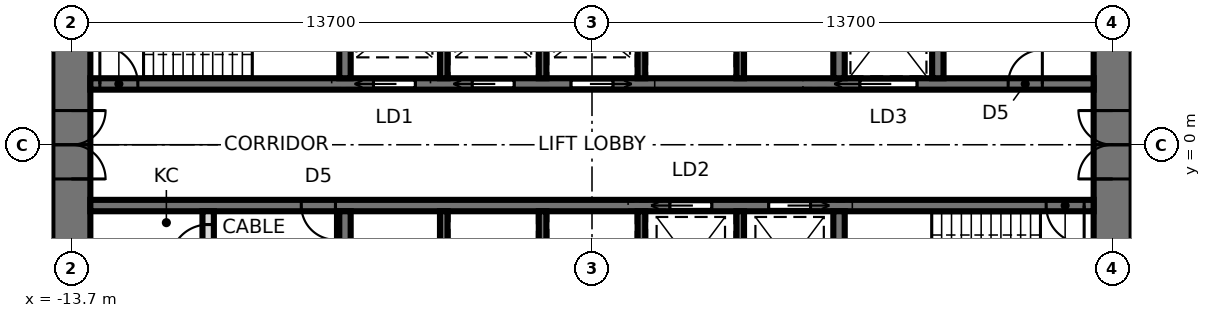
"""IFC4 building model, lengths in metres.
Left out: names, types, materials, properties, quantities, classifications, styles, units other than length and angle.
Written with IfcOpenShell. Run it as: python <this file> out.ifc"""

import sys

from ifc_helpers import new_model, si_unit, direction, frame, frame_2d, origin, place, context, subcontext, project, spatial, rectangle, extrude, element, fill, save


model = new_model("IFC4")
c1 = context("Model", 3, precision=1e-05, world=origin(), true_north=direction((0.0, 1.0)))
c2 = subcontext(c1, "Body", "Model", "MODEL_VIEW")
j1 = project(units=[si_unit("LENGTHUNIT", "METRE"), si_unit("PLANEANGLEUNIT", "RADIAN")], contexts=[c1])
p1 = place(None, origin())
s1 = spatial("IfcSite", under=j1, at=p1, CompositionType="ELEMENT")
p2 = place(p1, origin())
s2 = spatial("IfcBuilding", under=s1, at=p2, CompositionType="ELEMENT")
p3 = place(p2, frame((0.0, 0.0, 65.8)))
s3 = spatial("IfcBuildingStorey", under=s2, at=p3, CompositionType="ELEMENT", Elevation=65.8)
p4 = place(p3, frame((13.7, -9.5, 0.0), z_axis=(0.0, 0.0, 1.0), x_axis=(0.0, 1.0, 0.0)))
e1 = element("IfcWall", 1, at=p4, inside=s3, PredefinedType="SHEAR", context=c2, shape_type="SweptSolid", body=[
    extrude(rectangle(XDim=19.0, YDim=1.0, at=frame_2d((9.5, 0.0))), origin(), (0.0, 0.0, 1.0), 4.2),
])
p5 = place(p4, frame((8.6, 0.0, 0.0)))
e2 = element("IfcOpeningElement", 2, at=p5, cuts=e1, PredefinedType="OPENING", context=c2, shape_type="SweptSolid", body=[
    extrude(rectangle(XDim=1.8, YDim=2.4, at=frame_2d((0.9, 1.2))), frame((0.0, 0.51, 0.0), z_axis=(0.0, -1.0, 0.0), x_axis=(1.0, 0.0, 0.0)), (0.0, 0.0, 1.0), 1.02),
])
p6 = place(p3, frame((-13.7, 9.5, 0.0), z_axis=(0.0, 0.0, 1.0), x_axis=(0.0, -1.0, 0.0)))
e3 = element("IfcWall", 3, at=p6, inside=s3, PredefinedType="SHEAR", context=c2, shape_type="SweptSolid", body=[
    extrude(rectangle(XDim=19.0, YDim=1.0, at=frame_2d((9.5, 0.0))), origin(), (0.0, 0.0, 1.0), 4.2),
])
p7 = place(p6, frame((8.6, 0.0, 0.0)))
e4 = element("IfcOpeningElement", 4, at=p7, cuts=e3, PredefinedType="OPENING", context=c2, shape_type="SweptSolid", body=[
    extrude(rectangle(XDim=1.8, YDim=2.4, at=frame_2d((0.9, 1.2))), frame((0.0, 0.51, 0.0), z_axis=(0.0, -1.0, 0.0), x_axis=(1.0, 0.0, 0.0)), (0.0, 0.0, 1.0), 1.02),
])
p8 = place(p3, frame((-13.2, 1.6, 0.0), z_axis=(0.0, 0.0, 1.0), x_axis=(1.0, 0.0, 0.0)))
e5 = element("IfcWall", 5, at=p8, inside=s3, PredefinedType="SHEAR", context=c2, shape_type="SweptSolid", body=[
    extrude(rectangle(XDim=26.4, YDim=0.3, at=frame_2d((13.2, 0.0))), origin(), (0.0, 0.0, 1.0), 4.2),
])
p9 = place(p8, frame((0.25, 0.0, 0.0)))
e6 = element("IfcOpeningElement", 6, at=p9, cuts=e5, PredefinedType="OPENING", context=c2, shape_type="SweptSolid", body=[
    extrude(rectangle(XDim=1.0, YDim=2.1, at=frame_2d((0.5, 1.05))), frame((0.0, 0.16, 0.0), z_axis=(0.0, -1.0, 0.0), x_axis=(1.0, 0.0, 0.0)), (0.0, 0.0, 1.0), 0.32),
])
p10 = place(p8, frame((20.25, 0.0, 0.0)))
e7 = element("IfcOpeningElement", 7, at=p10, cuts=e5, PredefinedType="OPENING", context=c2, shape_type="SweptSolid", body=[
    extrude(rectangle(XDim=1.5, YDim=2.4, at=frame_2d((0.75, 1.2))), frame((0.0, 0.16, 0.0), z_axis=(0.0, -1.0, 0.0), x_axis=(1.0, 0.0, 0.0)), (0.0, 0.0, 1.0), 0.32),
])
p11 = place(p8, frame((7.45, 0.0, 0.0)))
e8 = element("IfcOpeningElement", 8, at=p11, cuts=e5, PredefinedType="OPENING", context=c2, shape_type="SweptSolid", body=[
    extrude(rectangle(XDim=1.1, YDim=2.3, at=frame_2d((0.55, 1.15))), frame((0.0, 0.16, 0.0), z_axis=(0.0, -1.0, 0.0), x_axis=(1.0, 0.0, 0.0)), (0.0, 0.0, 1.0), 0.32),
])
p12 = place(p8, frame((10.05, 0.0, 0.0)))
e9 = element("IfcOpeningElement", 9, at=p12, cuts=e5, PredefinedType="OPENING", context=c2, shape_type="SweptSolid", body=[
    extrude(rectangle(XDim=1.1, YDim=2.3, at=frame_2d((0.55, 1.15))), frame((0.0, 0.16, 0.0), z_axis=(0.0, -1.0, 0.0), x_axis=(1.0, 0.0, 0.0)), (0.0, 0.0, 1.0), 0.32),
])
p13 = place(p8, frame((12.65, 0.0, 0.0)))
e10 = element("IfcOpeningElement", 10, at=p13, cuts=e5, PredefinedType="OPENING", context=c2, shape_type="SweptSolid", body=[
    extrude(rectangle(XDim=1.1, YDim=2.3, at=frame_2d((0.55, 1.15))), frame((0.0, 0.16, 0.0), z_axis=(0.0, -1.0, 0.0), x_axis=(1.0, 0.0, 0.0)), (0.0, 0.0, 1.0), 0.32),
])
p14 = place(p8, frame((24.15, 0.0, 0.0)))
e11 = element("IfcOpeningElement", 11, at=p14, cuts=e5, PredefinedType="OPENING", context=c2, shape_type="SweptSolid", body=[
    extrude(rectangle(XDim=0.9, YDim=2.1, at=frame_2d((0.45, 1.05))), frame((0.0, 0.16, 0.0), z_axis=(0.0, -1.0, 0.0), x_axis=(1.0, 0.0, 0.0)), (0.0, 0.0, 1.0), 0.32),
])
p15 = place(p3, frame((-13.2, -1.6, 0.0), z_axis=(0.0, 0.0, 1.0), x_axis=(1.0, 0.0, 0.0)))
e12 = element("IfcWall", 12, at=p15, inside=s3, PredefinedType="SHEAR", context=c2, shape_type="SweptSolid", body=[
    extrude(rectangle(XDim=26.4, YDim=0.3, at=frame_2d((13.2, 0.0))), origin(), (0.0, 0.0, 1.0), 4.2),
])
p16 = place(p15, frame((25.15, 0.0, 0.0)))
e13 = element("IfcOpeningElement", 13, at=p16, cuts=e12, PredefinedType="OPENING", context=c2, shape_type="SweptSolid", body=[
    extrude(rectangle(XDim=1.0, YDim=2.1, at=frame_2d((0.5, 1.05))), frame((0.0, 0.16, 0.0), z_axis=(0.0, -1.0, 0.0), x_axis=(1.0, 0.0, 0.0)), (0.0, 0.0, 1.0), 0.32),
])
p17 = place(p15, frame((15.25, 0.0, 0.0)))
e14 = element("IfcOpeningElement", 14, at=p17, cuts=e12, PredefinedType="OPENING", context=c2, shape_type="SweptSolid", body=[
    extrude(rectangle(XDim=1.1, YDim=2.3, at=frame_2d((0.55, 1.15))), frame((0.0, 0.16, 0.0), z_axis=(0.0, -1.0, 0.0), x_axis=(1.0, 0.0, 0.0)), (0.0, 0.0, 1.0), 0.32),
])
p18 = place(p15, frame((17.85, 0.0, 0.0)))
e15 = element("IfcOpeningElement", 15, at=p18, cuts=e12, PredefinedType="OPENING", context=c2, shape_type="SweptSolid", body=[
    extrude(rectangle(XDim=1.1, YDim=2.3, at=frame_2d((0.55, 1.15))), frame((0.0, 0.16, 0.0), z_axis=(0.0, -1.0, 0.0), x_axis=(1.0, 0.0, 0.0)), (0.0, 0.0, 1.0), 0.32),
])
p19 = place(p15, frame((5.55, 0.0, 0.0)))
e16 = element("IfcOpeningElement", 16, at=p19, cuts=e12, PredefinedType="OPENING", context=c2, shape_type="SweptSolid", body=[
    extrude(rectangle(XDim=0.9, YDim=2.1, at=frame_2d((0.45, 1.05))), frame((0.0, 0.16, 0.0), z_axis=(0.0, -1.0, 0.0), x_axis=(1.0, 0.0, 0.0)), (0.0, 0.0, 1.0), 0.32),
])
for number, where, z_axis, x_axis in (
    (17, (-6.5, 1.75, 0.0), (0.0, 0.0, 1.0), (0.0, 1.0, 0.0)),
    (18, (6.5, 1.75, 0.0), (0.0, 0.0, 1.0), (0.0, 1.0, 0.0)),
):
    element("IfcWall", number, at=place(p3, frame(where, z_axis=z_axis, x_axis=x_axis)), inside=s3, PredefinedType="SHEAR", context=c2, shape_type="SweptSolid", body=[
        extrude(rectangle(XDim=2.7, YDim=0.3, at=frame_2d((1.35, 0.0))), origin(), (0.0, 0.0, 1.0), 4.2),
    ])
for number, where, z_axis, x_axis in (
    (19, (-3.9, 1.75, 0.0), (0.0, 0.0, 1.0), (0.0, 1.0, 0.0)),
    (20, (-1.3, 1.75, 0.0), (0.0, 0.0, 1.0), (0.0, 1.0, 0.0)),
    (21, (1.3, 1.75, 0.0), (0.0, 0.0, 1.0), (0.0, 1.0, 0.0)),
    (22, (3.9, 1.75, 0.0), (0.0, 0.0, 1.0), (0.0, 1.0, 0.0)),
):
    element("IfcWall", number, at=place(p3, frame(where, z_axis=z_axis, x_axis=x_axis)), inside=s3, PredefinedType="SHEAR", context=c2, shape_type="SweptSolid", body=[
        extrude(rectangle(XDim=2.7, YDim=0.2, at=frame_2d((1.35, 0.0))), origin(), (0.0, 0.0, 1.0), 4.2),
    ])
for number, where, z_axis, x_axis in (
    (23, (-6.5, -1.75, 0.0), (0.0, 0.0, 1.0), (0.0, -1.0, 0.0)),
    (24, (6.5, -1.75, 0.0), (0.0, 0.0, 1.0), (0.0, -1.0, 0.0)),
):
    element("IfcWall", number, at=place(p3, frame(where, z_axis=z_axis, x_axis=x_axis)), inside=s3, PredefinedType="SHEAR", context=c2, shape_type="SweptSolid", body=[
        extrude(rectangle(XDim=2.7, YDim=0.3, at=frame_2d((1.35, 0.0))), origin(), (0.0, 0.0, 1.0), 4.2),
    ])
for number, where, z_axis, x_axis in (
    (25, (-3.9, -1.75, 0.0), (0.0, 0.0, 1.0), (0.0, -1.0, 0.0)),
    (26, (-1.3, -1.75, 0.0), (0.0, 0.0, 1.0), (0.0, -1.0, 0.0)),
    (27, (1.3, -1.75, 0.0), (0.0, 0.0, 1.0), (0.0, -1.0, 0.0)),
    (28, (3.9, -1.75, 0.0), (0.0, 0.0, 1.0), (0.0, -1.0, 0.0)),
):
    element("IfcWall", number, at=place(p3, frame(where, z_axis=z_axis, x_axis=x_axis)), inside=s3, PredefinedType="SHEAR", context=c2, shape_type="SweptSolid", body=[
        extrude(rectangle(XDim=2.7, YDim=0.2, at=frame_2d((1.35, 0.0))), origin(), (0.0, 0.0, 1.0), 4.2),
    ])
p20 = place(p3, frame((9.1, 1.75, 0.0), z_axis=(0.0, 0.0, 1.0), x_axis=(0.0, 1.0, 0.0)))
e29 = element("IfcWall", 29, at=p20, inside=s3, PredefinedType="SHEAR", context=c2, shape_type="SweptSolid", body=[
    extrude(rectangle(XDim=2.7, YDim=0.3, at=frame_2d((1.35, 0.0))), origin(), (0.0, 0.0, 1.0), 4.2),
])
p21 = place(p3, frame((-10.1, -3.25, 0.0), z_axis=(0.0, 0.0, 1.0), x_axis=(0.0, 1.0, 0.0)))
e30 = element("IfcWall", 30, at=p21, inside=s3, PredefinedType="PARTITIONING", context=c2, shape_type="SweptSolid", body=[
    extrude(rectangle(XDim=1.5, YDim=0.3, at=frame_2d((0.75, 0.0))), origin(), (0.0, 0.0, 1.0), 4.04),
])
p22 = place(p21, frame((0.15, 0.0, 0.0)))
e31 = element("IfcOpeningElement", 31, at=p22, cuts=e30, PredefinedType="OPENING", context=c2, shape_type="SweptSolid", body=[
    extrude(rectangle(XDim=1.0, YDim=2.4, at=frame_2d((0.5, 1.2))), frame((0.0, 0.16, 0.0), z_axis=(0.0, -1.0, 0.0), x_axis=(1.0, 0.0, 0.0)), (0.0, 0.0, 1.0), 0.32),
])
p23 = place(p7, origin())
e32 = element("IfcDoor", 32, at=p23, inside=s3, OperationType="DOUBLE_DOOR_SINGLE_SWING", PredefinedType="DOOR", context=c2, shape_type="SweptSolid", body=[
    extrude(rectangle(XDim=1.72, YDim=2.36, at=frame_2d((0.9, 1.18))), frame((0.0, 0.025, 0.0), z_axis=(0.0, -1.0, 0.0), x_axis=(1.0, 0.0, 0.0)), (0.0, 0.0, 1.0), 0.05),
    extrude(rectangle(XDim=0.04, YDim=2.4, at=frame_2d((0.02, 1.2))), frame((0.0, 0.25, 0.0), z_axis=(0.0, -1.0, 0.0), x_axis=(1.0, 0.0, 0.0)), (0.0, 0.0, 1.0), 0.5),
    extrude(rectangle(XDim=0.04, YDim=2.4, at=frame_2d((1.78, 1.2))), frame((0.0, 0.25, 0.0), z_axis=(0.0, -1.0, 0.0), x_axis=(1.0, 0.0, 0.0)), (0.0, 0.0, 1.0), 0.5),
    extrude(rectangle(XDim=1.72, YDim=0.04, at=frame_2d((0.9, 2.38))), frame((0.0, 0.25, 0.0), z_axis=(0.0, -1.0, 0.0), x_axis=(1.0, 0.0, 0.0)), (0.0, 0.0, 1.0), 0.5),
])
fill(e4, e32)
p24 = place(p5, origin())
e33 = element("IfcDoor", 33, at=p24, inside=s3, OperationType="DOUBLE_DOOR_SINGLE_SWING", PredefinedType="DOOR", context=c2, shape_type="SweptSolid", body=[
    extrude(rectangle(XDim=1.72, YDim=2.36, at=frame_2d((0.9, 1.18))), frame((0.0, 0.025, 0.0), z_axis=(0.0, -1.0, 0.0), x_axis=(1.0, 0.0, 0.0)), (0.0, 0.0, 1.0), 0.05),
    extrude(rectangle(XDim=0.04, YDim=2.4, at=frame_2d((0.02, 1.2))), frame((0.0, 0.25, 0.0), z_axis=(0.0, -1.0, 0.0), x_axis=(1.0, 0.0, 0.0)), (0.0, 0.0, 1.0), 0.5),
    extrude(rectangle(XDim=0.04, YDim=2.4, at=frame_2d((1.78, 1.2))), frame((0.0, 0.25, 0.0), z_axis=(0.0, -1.0, 0.0), x_axis=(1.0, 0.0, 0.0)), (0.0, 0.0, 1.0), 0.5),
    extrude(rectangle(XDim=1.72, YDim=0.04, at=frame_2d((0.9, 2.38))), frame((0.0, 0.25, 0.0), z_axis=(0.0, -1.0, 0.0), x_axis=(1.0, 0.0, 0.0)), (0.0, 0.0, 1.0), 0.5),
])
fill(e2, e33)
p25 = place(p9, origin())
e34 = element("IfcDoor", 34, at=p25, inside=s3, OperationType="SINGLE_SWING_LEFT", PredefinedType="DOOR", context=c2, shape_type="SweptSolid", body=[
    extrude(rectangle(XDim=1.0, YDim=2.1, at=frame_2d((0.5, 1.05))), frame((0.0, 0.025, 0.0), z_axis=(0.0, -1.0, 0.0), x_axis=(1.0, 0.0, 0.0)), (0.0, 0.0, 1.0), 0.05),
])
fill(e6, e34)
p26 = place(p16, frame((1.0, 0.0, 0.0), z_axis=(0.0, 0.0, 1.0), x_axis=(-1.0, 0.0, 0.0)))
e35 = element("IfcDoor", 35, at=p26, inside=s3, OperationType="SINGLE_SWING_LEFT", PredefinedType="DOOR", context=c2, shape_type="SweptSolid", body=[
    extrude(rectangle(XDim=1.0, YDim=2.1, at=frame_2d((0.5, 1.05))), frame((0.0, 0.025, 0.0), z_axis=(0.0, -1.0, 0.0), x_axis=(1.0, 0.0, 0.0)), (0.0, 0.0, 1.0), 0.05),
])
fill(e13, e35)
p27 = place(p10, origin())
e36 = element("IfcDoor", 36, at=p27, inside=s3, OperationType="SLIDING_TO_LEFT", PredefinedType="DOOR", context=c2, shape_type="SweptSolid", body=[
    extrude(rectangle(XDim=1.5, YDim=2.4, at=frame_2d((0.75, 1.2))), frame((0.0, 0.025, 0.0), z_axis=(0.0, -1.0, 0.0), x_axis=(1.0, 0.0, 0.0)), (0.0, 0.0, 1.0), 0.05),
])
fill(e7, e36)
p28 = place(p11, origin())
e37 = element("IfcDoor", 37, at=p28, inside=s3, OperationType="SLIDING_TO_LEFT", PredefinedType="DOOR", context=c2, shape_type="SweptSolid", body=[
    extrude(rectangle(XDim=1.1, YDim=2.3, at=frame_2d((0.55, 1.15))), frame((0.0, 0.025, 0.0), z_axis=(0.0, -1.0, 0.0), x_axis=(1.0, 0.0, 0.0)), (0.0, 0.0, 1.0), 0.05),
])
fill(e8, e37)
p29 = place(p12, origin())
e38 = element("IfcDoor", 38, at=p29, inside=s3, OperationType="SLIDING_TO_LEFT", PredefinedType="DOOR", context=c2, shape_type="SweptSolid", body=[
    extrude(rectangle(XDim=1.1, YDim=2.3, at=frame_2d((0.55, 1.15))), frame((0.0, 0.025, 0.0), z_axis=(0.0, -1.0, 0.0), x_axis=(1.0, 0.0, 0.0)), (0.0, 0.0, 1.0), 0.05),
])
fill(e9, e38)
p30 = place(p13, origin())
e39 = element("IfcDoor", 39, at=p30, inside=s3, OperationType="SLIDING_TO_RIGHT", PredefinedType="DOOR", context=c2, shape_type="SweptSolid", body=[
    extrude(rectangle(XDim=1.1, YDim=2.3, at=frame_2d((0.55, 1.15))), frame((0.0, 0.025, 0.0), z_axis=(0.0, -1.0, 0.0), x_axis=(1.0, 0.0, 0.0)), (0.0, 0.0, 1.0), 0.05),
])
fill(e10, e39)
p31 = place(p17, frame((1.1, 0.0, 0.0), z_axis=(0.0, 0.0, 1.0), x_axis=(-1.0, 0.0, 0.0)))
e40 = element("IfcDoor", 40, at=p31, inside=s3, OperationType="SLIDING_TO_RIGHT", PredefinedType="DOOR", context=c2, shape_type="SweptSolid", body=[
    extrude(rectangle(XDim=1.1, YDim=2.3, at=frame_2d((0.55, 1.15))), frame((0.0, 0.025, 0.0), z_axis=(0.0, -1.0, 0.0), x_axis=(1.0, 0.0, 0.0)), (0.0, 0.0, 1.0), 0.05),
])
fill(e14, e40)
p32 = place(p18, frame((1.1, 0.0, 0.0), z_axis=(0.0, 0.0, 1.0), x_axis=(-1.0, 0.0, 0.0)))
e41 = element("IfcDoor", 41, at=p32, inside=s3, OperationType="SLIDING_TO_LEFT", PredefinedType="DOOR", context=c2, shape_type="SweptSolid", body=[
    extrude(rectangle(XDim=1.1, YDim=2.3, at=frame_2d((0.55, 1.15))), frame((0.0, 0.025, 0.0), z_axis=(0.0, -1.0, 0.0), x_axis=(1.0, 0.0, 0.0)), (0.0, 0.0, 1.0), 0.05),
])
fill(e15, e41)
p33 = place(p14, origin())
e42 = element("IfcDoor", 42, at=p33, inside=s3, OperationType="SINGLE_SWING_RIGHT", PredefinedType="DOOR", context=c2, shape_type="SweptSolid", body=[
    extrude(rectangle(XDim=0.9, YDim=2.1, at=frame_2d((0.45, 1.05))), frame((0.0, 0.025, 0.0), z_axis=(0.0, -1.0, 0.0), x_axis=(1.0, 0.0, 0.0)), (0.0, 0.0, 1.0), 0.05),
])
fill(e11, e42)
p34 = place(p19, frame((0.9, 0.0, 0.0), z_axis=(0.0, 0.0, 1.0), x_axis=(-1.0, 0.0, 0.0)))
e43 = element("IfcDoor", 43, at=p34, inside=s3, OperationType="SINGLE_SWING_LEFT", PredefinedType="DOOR", context=c2, shape_type="SweptSolid", body=[
    extrude(rectangle(XDim=0.9, YDim=2.1, at=frame_2d((0.45, 1.05))), frame((0.0, 0.025, 0.0), z_axis=(0.0, -1.0, 0.0), x_axis=(1.0, 0.0, 0.0)), (0.0, 0.0, 1.0), 0.05),
])
fill(e16, e43)
p35 = place(p22, origin())
e44 = element("IfcDoor", 44, at=p35, inside=s3, OperationType="SINGLE_SWING_LEFT", PredefinedType="DOOR", context=c2, shape_type="SweptSolid", body=[
    extrude(rectangle(XDim=1.0, YDim=2.4, at=frame_2d((0.5, 1.2))), frame((0.0, 0.025, 0.0), z_axis=(0.0, -1.0, 0.0), x_axis=(1.0, 0.0, 0.0)), (0.0, 0.0, 1.0), 0.05),
])
fill(e31, e44)
save(model, sys.argv[1])
